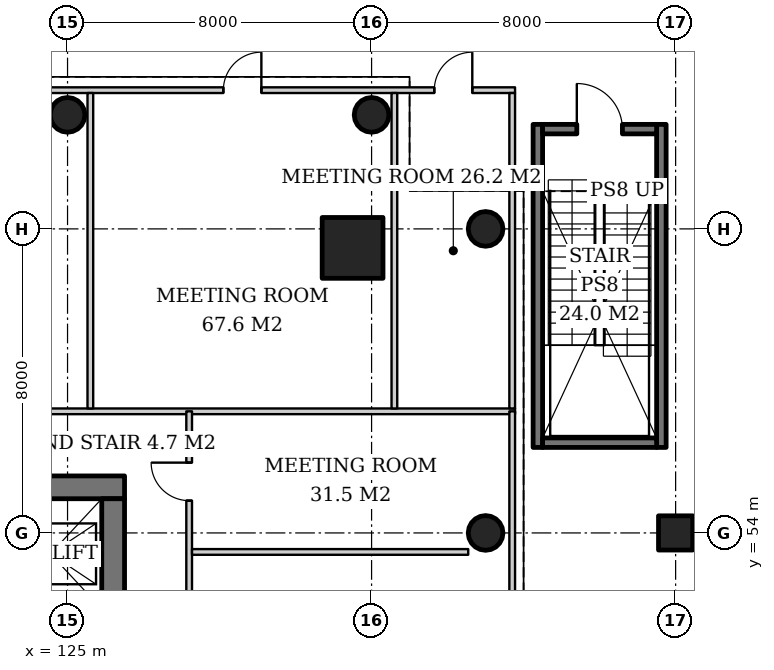
"""IFC4 building model, lengths in metres.
Left out: names, types, materials, properties, quantities, classifications, styles, units other than length and angle.
Written with IfcOpenShell. Run it as: python <this file> out.ifc"""

import sys

from ifc_helpers import new_model, si_unit, direction, frame, frame_2d, origin, origin_2d, place, context, subcontext, project, spatial, rectangle, hollow_circle, extrude, element, fill, save


model = new_model("IFC4")
c1 = context("Model", 3, precision=1e-05, world=origin(), true_north=direction((0.0, 1.0)))
c2 = subcontext(c1, "Body", "Model", "MODEL_VIEW")
j1 = project(units=[si_unit("LENGTHUNIT", "METRE"), si_unit("PLANEANGLEUNIT", "RADIAN")], contexts=[c1])
p1 = place(None, origin())
s1 = spatial("IfcSite", under=j1, at=p1, CompositionType="ELEMENT")
p2 = place(p1, origin())
s2 = spatial("IfcBuilding", under=s1, at=p2, CompositionType="ELEMENT")
p3 = place(p2, frame((0.0, 0.0, 11.0)))
s3 = spatial("IfcBuildingStorey", under=s2, at=p3, CompositionType="ELEMENT", Elevation=11.0)
p4 = place(p3, frame((141.0, 54.0, 0.0), z_axis=(0.0, 0.0, 1.0), x_axis=(1.0, 0.0, 0.0)))
e1 = element("IfcColumn", 1, at=p4, inside=s3, PredefinedType="COLUMN", context=c2, shape_type="SweptSolid", body=[
    extrude(rectangle(XDim=0.9, YDim=0.9, at=origin_2d()), origin(), (0.0, 0.0, 1.0), 5.0),
])
p5 = place(p3, frame((132.5, 61.5, 0.0), z_axis=(0.0, 0.0, 1.0), x_axis=(1.0, 0.0, 0.0)))
e2 = element("IfcColumn", 2, at=p5, inside=s3, PredefinedType="COLUMN", context=c2, shape_type="SweptSolid", body=[
    extrude(rectangle(XDim=1.6, YDim=1.6, at=origin_2d()), origin(), (0.0, 0.0, 1.0), 5.0),
])
for number, where, z_axis, x_axis in (
    (3, (136.0, 62.0, 0.0), (0.0, 0.0, 1.0), (1.0, 0.0, 0.0)),
    (4, (136.0, 54.0, 0.0), (0.0, 0.0, 1.0), (1.0, 0.0, 0.0)),
    (5, (133.0, 65.0, 0.0), (0.0, 0.0, 1.0), (1.0, 0.0, 0.0)),
    (6, (125.0, 65.0, 0.0), (0.0, 0.0, 1.0), (1.0, 0.0, 0.0)),
):
    element("IfcColumn", number, at=place(p3, frame(where, z_axis=z_axis, x_axis=x_axis)), inside=s3, PredefinedType="COLUMN", context=c2, shape_type="SweptSolid", body=[
        extrude(hollow_circle(Radius=0.457, WallThickness=0.03, at=origin_2d()), origin(), (0.0, 0.0, 1.0), 5.0),
    ])
p6 = place(p3, frame((107.5, 55.2, 0.0), z_axis=(0.0, 0.0, 1.0), x_axis=(1.0, 0.0, 0.0)))
e7 = element("IfcWall", 7, at=p6, inside=s3, PredefinedType="SHEAR", context=c2, shape_type="SweptSolid", body=[
    extrude(rectangle(XDim=19.0, YDim=0.6, at=frame_2d((9.5, 0.0))), origin(), (0.0, 0.0, 1.0), 5.0),
])
p7 = place(p6, frame((14.14, 0.0, 0.0)))
e8 = element("IfcOpeningElement", 8, at=p7, cuts=e7, PredefinedType="OPENING", context=c2, shape_type="SweptSolid", body=[
    extrude(rectangle(XDim=1.0, YDim=2.1, at=frame_2d((0.5, 1.05))), frame((0.0, 0.31, 0.0), z_axis=(0.0, -1.0, 0.0), x_axis=(1.0, 0.0, 0.0)), (0.0, 0.0, 1.0), 0.62),
])
p8 = place(p6, frame((1.675, 0.0, 0.0)))
e9 = element("IfcOpeningElement", 9, at=p8, cuts=e7, PredefinedType="OPENING", context=c2, shape_type="SweptSolid", body=[
    extrude(rectangle(XDim=1.0, YDim=2.1, at=frame_2d((0.5, 1.05))), frame((0.0, 0.31, 0.0), z_axis=(0.0, -1.0, 0.0), x_axis=(1.0, 0.0, 0.0)), (0.0, 0.0, 1.0), 0.62),
])
p9 = place(p6, frame((3.587, 0.0, 0.0)))
e10 = element("IfcOpeningElement", 10, at=p9, cuts=e7, PredefinedType="OPENING", context=c2, shape_type="SweptSolid", body=[
    extrude(rectangle(XDim=1.0, YDim=2.1, at=frame_2d((0.5, 1.05))), frame((0.0, 0.31, 0.0), z_axis=(0.0, -1.0, 0.0), x_axis=(1.0, 0.0, 0.0)), (0.0, 0.0, 1.0), 0.62),
])
p10 = place(p3, frame((126.2, 37.1, 0.0), z_axis=(0.0, 0.0, 1.0), x_axis=(0.0, 1.0, 0.0)))
e11 = element("IfcWall", 11, at=p10, inside=s3, PredefinedType="SHEAR", context=c2, shape_type="SweptSolid", body=[
    extrude(rectangle(XDim=17.8, YDim=0.6, at=frame_2d((8.9, 0.0))), origin(), (0.0, 0.0, 1.0), 5.0),
])
p11 = place(p10, frame((8.0, 0.0, 0.0)))
e12 = element("IfcOpeningElement", 12, at=p11, cuts=e11, PredefinedType="OPENING", context=c2, shape_type="SweptSolid", body=[
    extrude(rectangle(XDim=1.8, YDim=2.4, at=frame_2d((0.9, 1.2))), frame((0.0, 0.31, 0.0), z_axis=(0.0, -1.0, 0.0), x_axis=(1.0, 0.0, 0.0)), (0.0, 0.0, 1.0), 0.62),
])
for number, where, z_axis, x_axis in (
    (13, (137.375, 56.25, 0.0), (0.0, 0.0, 1.0), (0.0, 1.0, 0.0)),
    (14, (140.625, 56.25, 0.0), (0.0, 0.0, 1.0), (0.0, 1.0, 0.0)),
):
    element("IfcWall", number, at=place(p3, frame(where, z_axis=z_axis, x_axis=x_axis)), inside=s3, PredefinedType="SOLIDWALL", context=c2, shape_type="SweptSolid", body=[
        extrude(rectangle(XDim=8.5, YDim=0.25, at=frame_2d((4.25, 0.0))), origin(), (0.0, 0.0, 1.0), 4.7),
    ])
p12 = place(p3, frame((137.5, 56.375, 0.0), z_axis=(0.0, 0.0, 1.0), x_axis=(1.0, 0.0, 0.0)))
e15 = element("IfcWall", 15, at=p12, inside=s3, PredefinedType="SOLIDWALL", context=c2, shape_type="SweptSolid", body=[
    extrude(rectangle(XDim=3.0, YDim=0.25, at=frame_2d((1.5, 0.0))), origin(), (0.0, 0.0, 1.0), 4.7),
])
p13 = place(p3, frame((137.5, 64.625, 0.0), z_axis=(0.0, 0.0, 1.0), x_axis=(1.0, 0.0, 0.0)))
e16 = element("IfcWall", 16, at=p13, inside=s3, PredefinedType="SOLIDWALL", context=c2, shape_type="SweptSolid", body=[
    extrude(rectangle(XDim=3.0, YDim=0.25, at=frame_2d((1.5, 0.0))), origin(), (0.0, 0.0, 1.0), 4.7),
])
p14 = place(p13, frame((0.9, 0.0, 0.0)))
e17 = element("IfcOpeningElement", 17, at=p14, cuts=e16, PredefinedType="OPENING", context=c2, shape_type="SweptSolid", body=[
    extrude(rectangle(XDim=1.2, YDim=2.1, at=frame_2d((0.6, 1.05))), frame((0.0, 0.135, 0.0), z_axis=(0.0, -1.0, 0.0), x_axis=(1.0, 0.0, 0.0)), (0.0, 0.0, 1.0), 0.27),
])
p15 = place(p3, frame((97.225, 57.2, 0.0), z_axis=(0.0, 0.0, 1.0), x_axis=(1.0, 0.0, 0.0)))
e18 = element("IfcWall", 18, at=p15, inside=s3, PredefinedType="PARTITIONING", context=c2, shape_type="SweptSolid", body=[
    extrude(rectangle(XDim=39.55, YDim=0.15, at=frame_2d((19.775, 0.0))), origin(), (0.0, 0.0, 1.0), 3.9),
])
p16 = place(p3, frame((97.225, 65.65, 0.0), z_axis=(0.0, 0.0, 1.0), x_axis=(1.0, 0.0, 0.0)))
e19 = element("IfcWall", 19, at=p16, inside=s3, PredefinedType="PARTITIONING", context=c2, shape_type="SweptSolid", body=[
    extrude(rectangle(XDim=39.55, YDim=0.15, at=frame_2d((19.775, 0.0))), origin(), (0.0, 0.0, 1.0), 3.2),
])
p17 = place(p16, frame((1.725, 0.0, 0.0)))
e20 = element("IfcOpeningElement", 20, at=p17, cuts=e19, PredefinedType="OPENING", context=c2, shape_type="SweptSolid", body=[
    extrude(rectangle(XDim=1.0, YDim=2.1, at=frame_2d((0.5, 1.05))), frame((0.0, 0.085, 0.0), z_axis=(0.0, -1.0, 0.0), x_axis=(1.0, 0.0, 0.0)), (0.0, 0.0, 1.0), 0.17),
])
p18 = place(p16, frame((7.875, 0.0, 0.0)))
e21 = element("IfcOpeningElement", 21, at=p18, cuts=e19, PredefinedType="OPENING", context=c2, shape_type="SweptSolid", body=[
    extrude(rectangle(XDim=1.0, YDim=2.1, at=frame_2d((0.5, 1.05))), frame((0.0, 0.085, 0.0), z_axis=(0.0, -1.0, 0.0), x_axis=(1.0, 0.0, 0.0)), (0.0, 0.0, 1.0), 0.17),
])
p19 = place(p16, frame((15.875, 0.0, 0.0)))
e22 = element("IfcOpeningElement", 22, at=p19, cuts=e19, PredefinedType="OPENING", context=c2, shape_type="SweptSolid", body=[
    extrude(rectangle(XDim=1.0, YDim=2.1, at=frame_2d((0.5, 1.05))), frame((0.0, 0.085, 0.0), z_axis=(0.0, -1.0, 0.0), x_axis=(1.0, 0.0, 0.0)), (0.0, 0.0, 1.0), 0.17),
])
p20 = place(p16, frame((23.875, 0.0, 0.0)))
e23 = element("IfcOpeningElement", 23, at=p20, cuts=e19, PredefinedType="OPENING", context=c2, shape_type="SweptSolid", body=[
    extrude(rectangle(XDim=1.0, YDim=2.1, at=frame_2d((0.5, 1.05))), frame((0.0, 0.085, 0.0), z_axis=(0.0, -1.0, 0.0), x_axis=(1.0, 0.0, 0.0)), (0.0, 0.0, 1.0), 0.17),
])
p21 = place(p16, frame((31.875, 0.0, 0.0)))
e24 = element("IfcOpeningElement", 24, at=p21, cuts=e19, PredefinedType="OPENING", context=c2, shape_type="SweptSolid", body=[
    extrude(rectangle(XDim=1.0, YDim=2.1, at=frame_2d((0.5, 1.05))), frame((0.0, 0.085, 0.0), z_axis=(0.0, -1.0, 0.0), x_axis=(1.0, 0.0, 0.0)), (0.0, 0.0, 1.0), 0.17),
])
p22 = place(p16, frame((37.425, 0.0, 0.0)))
e25 = element("IfcOpeningElement", 25, at=p22, cuts=e19, PredefinedType="OPENING", context=c2, shape_type="SweptSolid", body=[
    extrude(rectangle(XDim=1.0, YDim=2.1, at=frame_2d((0.5, 1.05))), frame((0.0, 0.085, 0.0), z_axis=(0.0, -1.0, 0.0), x_axis=(1.0, 0.0, 0.0)), (0.0, 0.0, 1.0), 0.17),
])
p23 = place(p3, frame((136.7, 57.275, 0.0), z_axis=(0.0, 0.0, 1.0), x_axis=(0.0, 1.0, 0.0)))
e26 = element("IfcWall", 26, at=p23, inside=s3, PredefinedType="PARTITIONING", context=c2, shape_type="SweptSolid", body=[
    extrude(rectangle(XDim=8.3, YDim=0.15, at=frame_2d((4.15, 0.0))), origin(), (0.0, 0.0, 1.0), 4.7),
])
p24 = place(p3, frame((125.6, 57.275, 0.0), z_axis=(0.0, 0.0, 1.0), x_axis=(0.0, 1.0, 0.0)))
e27 = element("IfcWall", 27, at=p24, inside=s3, PredefinedType="PARTITIONING", context=c2, shape_type="SweptSolid", body=[
    extrude(rectangle(XDim=8.3, YDim=0.15, at=frame_2d((4.15, 0.0))), origin(), (0.0, 0.0, 1.0), 4.15),
])
p25 = place(p3, frame((133.6, 57.275, 0.0), z_axis=(0.0, 0.0, 1.0), x_axis=(0.0, 1.0, 0.0)))
e28 = element("IfcWall", 28, at=p25, inside=s3, PredefinedType="PARTITIONING", context=c2, shape_type="SweptSolid", body=[
    extrude(rectangle(XDim=8.3, YDim=0.15, at=frame_2d((4.15, 0.0))), origin(), (0.0, 0.0, 1.0), 4.3),
])
p26 = place(p3, frame((128.2, 36.725, 0.0), z_axis=(0.0, 0.0, 1.0), x_axis=(0.0, 1.0, 0.0)))
e29 = element("IfcWall", 29, at=p26, inside=s3, PredefinedType="PARTITIONING", context=c2, shape_type="SweptSolid", body=[
    extrude(rectangle(XDim=20.475, YDim=0.15, at=frame_2d((10.237, 0.0))), origin(), (0.0, 0.0, 1.0), 3.9),
])
p27 = place(p26, frame((1.425, 0.0, 0.0)))
e30 = element("IfcOpeningElement", 30, at=p27, cuts=e29, PredefinedType="OPENING", context=c2, shape_type="SweptSolid", body=[
    extrude(rectangle(XDim=1.0, YDim=2.1, at=frame_2d((0.5, 1.05))), frame((0.0, 0.085, 0.0), z_axis=(0.0, -1.0, 0.0), x_axis=(1.0, 0.0, 0.0)), (0.0, 0.0, 1.0), 0.17),
])
p28 = place(p26, frame((5.275, 0.0, 0.0)))
e31 = element("IfcOpeningElement", 31, at=p28, cuts=e29, PredefinedType="OPENING", context=c2, shape_type="SweptSolid", body=[
    extrude(rectangle(XDim=1.0, YDim=2.1, at=frame_2d((0.5, 1.05))), frame((0.0, 0.085, 0.0), z_axis=(0.0, -1.0, 0.0), x_axis=(1.0, 0.0, 0.0)), (0.0, 0.0, 1.0), 0.17),
])
p29 = place(p26, frame((9.775, 0.0, 0.0)))
e32 = element("IfcOpeningElement", 32, at=p29, cuts=e29, PredefinedType="OPENING", context=c2, shape_type="SweptSolid", body=[
    extrude(rectangle(XDim=1.0, YDim=2.1, at=frame_2d((0.5, 1.05))), frame((0.0, 0.085, 0.0), z_axis=(0.0, -1.0, 0.0), x_axis=(1.0, 0.0, 0.0)), (0.0, 0.0, 1.0), 0.17),
])
p30 = place(p26, frame((14.275, 0.0, 0.0)))
e33 = element("IfcOpeningElement", 33, at=p30, cuts=e29, PredefinedType="OPENING", context=c2, shape_type="SweptSolid", body=[
    extrude(rectangle(XDim=1.0, YDim=2.1, at=frame_2d((0.5, 1.05))), frame((0.0, 0.085, 0.0), z_axis=(0.0, -1.0, 0.0), x_axis=(1.0, 0.0, 0.0)), (0.0, 0.0, 1.0), 0.17),
])
p31 = place(p26, frame((18.125, 0.0, 0.0)))
e34 = element("IfcOpeningElement", 34, at=p31, cuts=e29, PredefinedType="OPENING", context=c2, shape_type="SweptSolid", body=[
    extrude(rectangle(XDim=1.0, YDim=2.1, at=frame_2d((0.5, 1.05))), frame((0.0, 0.085, 0.0), z_axis=(0.0, -1.0, 0.0), x_axis=(1.0, 0.0, 0.0)), (0.0, 0.0, 1.0), 0.17),
])
p32 = place(p3, frame((136.7, 36.725, 0.0), z_axis=(0.0, 0.0, 1.0), x_axis=(0.0, 1.0, 0.0)))
e35 = element("IfcWall", 35, at=p32, inside=s3, PredefinedType="PARTITIONING", context=c2, shape_type="SweptSolid", body=[
    extrude(rectangle(XDim=20.475, YDim=0.15, at=frame_2d((10.237, 0.0))), origin(), (0.0, 0.0, 1.0), 4.7),
])
p33 = place(p3, frame((128.275, 53.5, 0.0), z_axis=(0.0, 0.0, 1.0), x_axis=(1.0, 0.0, 0.0)))
e36 = element("IfcWall", 36, at=p33, inside=s3, PredefinedType="PARTITIONING", context=c2, shape_type="SweptSolid", body=[
    extrude(rectangle(XDim=7.268, YDim=0.15, at=frame_2d((3.634, 0.0))), origin(), (0.0, 0.0, 1.0), 4.7),
])
p34 = place(p14, origin())
e37 = element("IfcDoor", 37, at=p34, inside=s3, OperationType="SINGLE_SWING_LEFT", PredefinedType="DOOR", context=c2, shape_type="SweptSolid", body=[
    extrude(rectangle(XDim=1.2, YDim=2.1, at=frame_2d((0.6, 1.05))), frame((0.0, 0.025, 0.0), z_axis=(0.0, -1.0, 0.0), x_axis=(1.0, 0.0, 0.0)), (0.0, 0.0, 1.0), 0.05),
])
fill(e17, e37)
p35 = place(p21, origin())
e38 = element("IfcDoor", 38, at=p35, inside=s3, OperationType="SINGLE_SWING_RIGHT", PredefinedType="DOOR", context=c2, shape_type="SweptSolid", body=[
    extrude(rectangle(XDim=1.0, YDim=2.1, at=frame_2d((0.5, 1.05))), frame((0.0, 0.025, 0.0), z_axis=(0.0, -1.0, 0.0), x_axis=(1.0, 0.0, 0.0)), (0.0, 0.0, 1.0), 0.05),
])
fill(e24, e38)
p36 = place(p22, origin())
e39 = element("IfcDoor", 39, at=p36, inside=s3, OperationType="SINGLE_SWING_RIGHT", PredefinedType="DOOR", context=c2, shape_type="SweptSolid", body=[
    extrude(rectangle(XDim=1.0, YDim=2.1, at=frame_2d((0.5, 1.05))), frame((0.0, 0.025, 0.0), z_axis=(0.0, -1.0, 0.0), x_axis=(1.0, 0.0, 0.0)), (0.0, 0.0, 1.0), 0.05),
])
fill(e25, e39)
p37 = place(p31, origin())
e40 = element("IfcDoor", 40, at=p37, inside=s3, OperationType="SINGLE_SWING_RIGHT", PredefinedType="DOOR", context=c2, shape_type="SweptSolid", body=[
    extrude(rectangle(XDim=1.0, YDim=2.1, at=frame_2d((0.5, 1.05))), frame((0.0, 0.025, 0.0), z_axis=(0.0, -1.0, 0.0), x_axis=(1.0, 0.0, 0.0)), (0.0, 0.0, 1.0), 0.05),
])
fill(e34, e40)
save(model, sys.argv[1])
